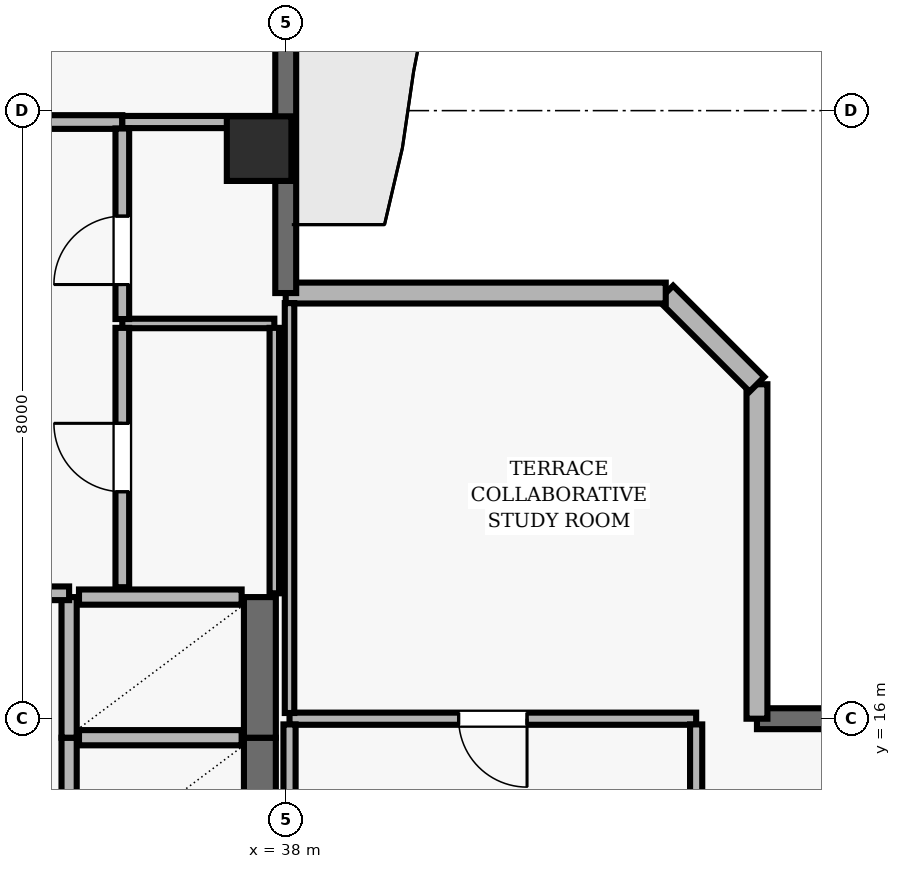
"""IFC4 building model, lengths in metres.
Left out: names, types, materials, properties, quantities, classifications, styles, units other than length and angle.
Written with IfcOpenShell. Run it as: python <this file> out.ifc"""

import sys

from ifc_helpers import new_model, si_unit, direction, frame, frame_2d, origin, origin_2d, place, context, subcontext, project, spatial, rectangle, extrude, element, fill, save


model = new_model("IFC4")
c1 = context("Model", 3, precision=1e-05, world=origin(), true_north=direction((0.0, 1.0)))
c2 = subcontext(c1, "Body", "Model", "MODEL_VIEW")
j1 = project(units=[si_unit("LENGTHUNIT", "METRE"), si_unit("PLANEANGLEUNIT", "RADIAN")], contexts=[c1])
p1 = place(None, origin())
s1 = spatial("IfcSite", under=j1, at=p1, CompositionType="ELEMENT")
p2 = place(p1, origin())
s2 = spatial("IfcBuilding", under=s1, at=p2, CompositionType="ELEMENT")
p3 = place(p2, frame((0.0, 0.0, 298.9)))
s3 = spatial("IfcBuildingStorey", under=s2, at=p3, CompositionType="ELEMENT", Elevation=298.9)
p4 = place(p3, frame((37.65, 23.5, 0.0), z_axis=(0.0, 0.0, 1.0), x_axis=(1.0, 0.0, 0.0)))
e1 = element("IfcColumn", 1, at=p4, inside=s3, PredefinedType="COLUMN", context=c2, shape_type="SweptSolid", body=[
    extrude(rectangle(XDim=0.85, YDim=0.85, at=origin_2d()), origin(), (0.0, 0.0, 1.0), 3.9),
])
p5 = place(p3, frame((57.3, 16.0, 0.0), z_axis=(0.0, 0.0, 1.0), x_axis=(-1.0, 0.0, 0.0)))
e2 = element("IfcWall", 2, at=p5, inside=s3, PredefinedType="SOLIDWALL", context=c2, shape_type="SweptSolid", body=[
    extrude(rectangle(XDim=13.1, YDim=0.275, at=frame_2d((6.55, 0.0))), origin(), (0.0, 0.0, 1.0), 3.69),
])
p6 = place(p5, frame((7.05, 0.0, 0.0)))
e3 = element("IfcOpeningElement", 3, at=p6, cuts=e2, PredefinedType="OPENING", context=c2, shape_type="SweptSolid", body=[
    extrude(rectangle(XDim=1.0, YDim=2.2, at=frame_2d((0.5, 1.1))), frame((0.0, 0.147, 0.0), z_axis=(0.0, -1.0, 0.0), x_axis=(1.0, 0.0, 0.0)), (0.0, 0.0, 1.0), 0.295),
])
p7 = place(p5, frame((9.975, 0.0, 0.9)))
e4 = element("IfcOpeningElement", 4, at=p7, cuts=e2, PredefinedType="OPENING", context=c2, shape_type="SweptSolid", body=[
    extrude(rectangle(XDim=1.5, YDim=1.8, at=frame_2d((0.75, 0.9))), frame((0.0, 0.147, 0.0), z_axis=(0.0, -1.0, 0.0), x_axis=(1.0, 0.0, 0.0)), (0.0, 0.0, 1.0), 0.295),
])
p8 = place(p3, frame((44.2, 16.0, 0.0), z_axis=(0.0, 0.0, 1.0), x_axis=(0.0, 1.0, 0.0)))
e5 = element("IfcWall", 5, at=p8, inside=s3, PredefinedType="SOLIDWALL", context=c2, shape_type="SweptSolid", body=[
    extrude(rectangle(XDim=4.4, YDim=0.275, at=frame_2d((2.2, 0.0))), origin(), (0.0, 0.0, 1.0), 3.69),
])
p9 = place(p3, frame((44.2, 20.4, 0.0), z_axis=(0.0, 0.0, 1.0), x_axis=(-0.707034851297, 0.707178703759, 0.0)))
e6 = element("IfcWall", 6, at=p9, inside=s3, PredefinedType="SOLIDWALL", context=c2, shape_type="SweptSolid", body=[
    extrude(rectangle(XDim=1.697, YDim=0.275, at=frame_2d((0.849, 0.0))), origin(), (0.0, 0.0, 1.0), 3.69),
])
p10 = place(p3, frame((43.0, 21.6, 0.0), z_axis=(0.0, 0.0, 1.0), x_axis=(-1.0, 0.0, 0.0)))
e7 = element("IfcWall", 7, at=p10, inside=s3, PredefinedType="SOLIDWALL", context=c2, shape_type="SweptSolid", body=[
    extrude(rectangle(XDim=5.0, YDim=0.275, at=frame_2d((2.5, 0.0))), origin(), (0.0, 0.0, 1.0), 3.69),
])
p11 = place(p3, frame((38.0, 21.6, 0.0), z_axis=(0.0, 0.0, 1.0), x_axis=(0.0, 1.0, 0.0)))
e8 = element("IfcWall", 8, at=p11, inside=s3, PredefinedType="SOLIDWALL", context=c2, shape_type="SweptSolid", body=[
    extrude(rectangle(XDim=13.7, YDim=0.275, at=frame_2d((6.85, 0.0))), origin(), (0.0, 0.0, 1.0), 3.69),
])
p12 = place(p11, frame((5.35, 0.0, 0.0)))
e9 = element("IfcOpeningElement", 9, at=p12, cuts=e8, PredefinedType="OPENING", context=c2, shape_type="SweptSolid", body=[
    extrude(rectangle(XDim=1.0, YDim=2.2, at=frame_2d((0.5, 1.1))), frame((0.0, 0.147, 0.0), z_axis=(0.0, -1.0, 0.0), x_axis=(1.0, 0.0, 0.0)), (0.0, 0.0, 1.0), 0.295),
])
p13 = place(p11, frame((9.375, 0.0, 0.9)))
e10 = element("IfcOpeningElement", 10, at=p13, cuts=e8, PredefinedType="OPENING", context=c2, shape_type="SweptSolid", body=[
    extrude(rectangle(XDim=1.8, YDim=2.2, at=frame_2d((0.9, 1.1))), frame((0.0, 0.147, 0.0), z_axis=(0.0, -1.0, 0.0), x_axis=(1.0, 0.0, 0.0)), (0.0, 0.0, 1.0), 0.295),
])
p14 = place(p3, frame((35.15, 15.75, 0.0), z_axis=(0.0, 0.0, 1.0), x_axis=(0.0, -1.0, 0.0)))
e11 = element("IfcWall", 11, at=p14, inside=s3, PredefinedType="SOLIDWALL", context=c2, shape_type="SweptSolid", body=[
    extrude(rectangle(XDim=1.85, YDim=0.2, at=frame_2d((0.925, 0.0))), origin(), (0.0, 0.0, 1.0), 3.69),
])
p15 = place(p3, frame((37.66, 13.9, 0.0), z_axis=(0.0, 0.0, 1.0), x_axis=(0.0, 1.0, 0.0)))
e12 = element("IfcWall", 12, at=p15, inside=s3, PredefinedType="SHEAR", context=c2, shape_type="SweptSolid", body=[
    extrude(rectangle(XDim=1.85, YDim=0.42, at=frame_2d((0.925, 0.0))), origin(), (0.0, 0.0, 1.0), 3.69),
])
p16 = place(p3, frame((37.42, 15.75, 0.0), z_axis=(0.0, 0.0, 1.0), x_axis=(-1.0, 0.0, 0.0)))
e13 = element("IfcWall", 13, at=p16, inside=s3, PredefinedType="SOLIDWALL", context=c2, shape_type="SweptSolid", body=[
    extrude(rectangle(XDim=2.14, YDim=0.2, at=frame_2d((1.07, 0.0))), origin(), (0.0, 0.0, 1.0), 3.69),
])
p17 = place(p3, frame((35.15, 17.6, 0.0), z_axis=(0.0, 0.0, 1.0), x_axis=(0.0, -1.0, 0.0)))
e14 = element("IfcWall", 14, at=p17, inside=s3, PredefinedType="SOLIDWALL", context=c2, shape_type="SweptSolid", body=[
    extrude(rectangle(XDim=1.85, YDim=0.2, at=frame_2d((0.925, 0.0))), origin(), (0.0, 0.0, 1.0), 3.69),
])
p18 = place(p3, frame((37.66, 15.75, 0.0), z_axis=(0.0, 0.0, 1.0), x_axis=(0.0, 1.0, 0.0)))
e15 = element("IfcWall", 15, at=p18, inside=s3, PredefinedType="SHEAR", context=c2, shape_type="SweptSolid", body=[
    extrude(rectangle(XDim=1.85, YDim=0.42, at=frame_2d((0.925, 0.0))), origin(), (0.0, 0.0, 1.0), 3.69),
])
p19 = place(p3, frame((37.42, 17.6, 0.0), z_axis=(0.0, 0.0, 1.0), x_axis=(-1.0, 0.0, 0.0)))
e16 = element("IfcWall", 16, at=p19, inside=s3, PredefinedType="SOLIDWALL", context=c2, shape_type="SweptSolid", body=[
    extrude(rectangle(XDim=2.14, YDim=0.2, at=frame_2d((1.07, 0.0))), origin(), (0.0, 0.0, 1.0), 3.69),
])
p20 = place(p3, frame((33.85, 17.65, 0.0), z_axis=(0.0, 0.0, 1.0), x_axis=(1.0, 0.0, 0.0)))
e17 = element("IfcWall", 17, at=p20, inside=s3, PredefinedType="PARTITIONING", context=c2, shape_type="SweptSolid", body=[
    extrude(rectangle(XDim=1.3, YDim=0.18, at=frame_2d((0.65, 0.0))), origin(), (0.0, 0.0, 1.0), 3.69),
])
p21 = place(p3, frame((35.85, 21.2, 0.0), z_axis=(0.0, 0.0, 1.0), x_axis=(1.0, 0.0, 0.0)))
e18 = element("IfcWall", 18, at=p21, inside=s3, PredefinedType="PARTITIONING", context=c2, shape_type="SweptSolid", body=[
    extrude(rectangle(XDim=2.0, YDim=0.125, at=frame_2d((1.0, 0.0))), origin(), (0.0, 0.0, 1.0), 3.69),
])
p22 = place(p3, frame((35.85, 23.85, 0.0), z_axis=(0.0, 0.0, 1.0), x_axis=(-1.0, 0.0, 0.0)))
e19 = element("IfcWall", 19, at=p22, inside=s3, PredefinedType="PARTITIONING", context=c2, shape_type="SweptSolid", body=[
    extrude(rectangle(XDim=2.0, YDim=0.18, at=frame_2d((1.0, 0.0))), origin(), (0.0, 0.0, 1.0), 3.227),
])
p23 = place(p3, frame((37.85, 23.85, 0.0), z_axis=(0.0, 0.0, 1.0), x_axis=(-1.0, 0.0, 0.0)))
e20 = element("IfcWall", 20, at=p23, inside=s3, PredefinedType="PARTITIONING", context=c2, shape_type="SweptSolid", body=[
    extrude(rectangle(XDim=2.0, YDim=0.16, at=frame_2d((1.0, 0.0))), origin(), (0.0, 0.0, 1.0), 3.227),
])
p24 = place(p3, frame((43.4, 16.0, 0.0), z_axis=(0.0, 0.0, 1.0), x_axis=(-1.0, 0.0, 0.0)))
e21 = element("IfcWall", 21, at=p24, inside=s3, PredefinedType="PARTITIONING", context=c2, shape_type="SweptSolid", body=[
    extrude(rectangle(XDim=5.35, YDim=0.16, at=frame_2d((2.675, 0.0))), origin(), (0.0, 0.0, 1.0), 3.39),
])
p25 = place(p24, frame((2.225, 0.0, 0.0)))
e22 = element("IfcOpeningElement", 22, at=p25, cuts=e21, PredefinedType="OPENING", context=c2, shape_type="SweptSolid", body=[
    extrude(rectangle(XDim=0.9, YDim=2.1, at=frame_2d((0.45, 1.05))), frame((0.0, 0.09, 0.0), z_axis=(0.0, -1.0, 0.0), x_axis=(1.0, 0.0, 0.0)), (0.0, 0.0, 1.0), 0.18),
])
p26 = place(p3, frame((35.85, 17.73, 0.0), z_axis=(0.0, 0.0, 1.0), x_axis=(0.0, 1.0, 0.0)))
e23 = element("IfcWall", 23, at=p26, inside=s3, PredefinedType="PARTITIONING", context=c2, shape_type="SweptSolid", body=[
    extrude(rectangle(XDim=3.412, YDim=0.18, at=frame_2d((1.706, 0.0))), origin(), (0.0, 0.0, 1.0), 3.69),
])
p27 = place(p26, frame((1.256, 0.0, 0.0)))
e24 = element("IfcOpeningElement", 24, at=p27, cuts=e23, PredefinedType="OPENING", context=c2, shape_type="SweptSolid", body=[
    extrude(rectangle(XDim=0.9, YDim=2.1, at=frame_2d((0.45, 1.05))), frame((0.0, 0.1, 0.0), z_axis=(0.0, -1.0, 0.0), x_axis=(1.0, 0.0, 0.0)), (0.0, 0.0, 1.0), 0.2),
])
p28 = place(p3, frame((35.85, 21.258, 0.0), z_axis=(0.0, 0.0, 1.0), x_axis=(0.0, 1.0, 0.0)))
e25 = element("IfcWall", 25, at=p28, inside=s3, PredefinedType="PARTITIONING", context=c2, shape_type="SweptSolid", body=[
    extrude(rectangle(XDim=2.507, YDim=0.18, at=frame_2d((1.253, 0.0))), origin(), (0.0, 0.0, 1.0), 3.69),
])
p29 = place(p28, frame((0.454, 0.0, 0.0)))
e26 = element("IfcOpeningElement", 26, at=p29, cuts=e25, PredefinedType="OPENING", context=c2, shape_type="SweptSolid", body=[
    extrude(rectangle(XDim=0.9, YDim=2.1, at=frame_2d((0.45, 1.05))), frame((0.0, 0.1, 0.0), z_axis=(0.0, -1.0, 0.0), x_axis=(1.0, 0.0, 0.0)), (0.0, 0.0, 1.0), 0.2),
])
p30 = place(p3, frame((37.85, 17.65, 0.0), z_axis=(0.0, 0.0, 1.0), x_axis=(0.0, 1.0, 0.0)))
e27 = element("IfcWall", 27, at=p30, inside=s3, PredefinedType="PARTITIONING", context=c2, shape_type="SweptSolid", body=[
    extrude(rectangle(XDim=3.492, YDim=0.125, at=frame_2d((1.746, 0.0))), origin(), (0.0, 0.0, 1.0), 3.227),
])
p31 = place(p3, frame((38.05, 15.925, 0.0), z_axis=(0.0, 0.0, 1.0), x_axis=(0.0, -1.0, 0.0)))
e28 = element("IfcWall", 28, at=p31, inside=s3, PredefinedType="PARTITIONING", context=c2, shape_type="SweptSolid", body=[
    extrude(rectangle(XDim=6.375, YDim=0.16, at=frame_2d((3.188, 0.0))), origin(), (0.0, 0.0, 1.0), 3.227),
])
p32 = place(p3, frame((38.05, 21.468, 0.0), z_axis=(0.0, 0.0, 1.0), x_axis=(0.0, -1.0, 0.0)))
e29 = element("IfcWall", 29, at=p32, inside=s3, PredefinedType="PARTITIONING", context=c2, shape_type="SweptSolid", body=[
    extrude(rectangle(XDim=5.393, YDim=0.125, at=frame_2d((2.697, 0.0))), origin(), (0.0, 0.0, 1.0), 3.227),
])
p33 = place(p3, frame((43.4, 10.425, 0.0), z_axis=(0.0, 0.0, 1.0), x_axis=(0.0, 1.0, 0.0)))
e30 = element("IfcWall", 30, at=p33, inside=s3, PredefinedType="PARTITIONING", context=c2, shape_type="SweptSolid", body=[
    extrude(rectangle(XDim=5.5, YDim=0.16, at=frame_2d((2.75, 0.0))), origin(), (0.0, 0.0, 1.0), 3.69),
])
p34 = place(p33, frame((2.3, 0.0, 0.0)))
e31 = element("IfcOpeningElement", 31, at=p34, cuts=e30, PredefinedType="OPENING", context=c2, shape_type="SweptSolid", body=[
    extrude(rectangle(XDim=0.9, YDim=2.1, at=frame_2d((0.45, 1.05))), frame((0.0, 0.09, 0.0), z_axis=(0.0, -1.0, 0.0), x_axis=(1.0, 0.0, 0.0)), (0.0, 0.0, 1.0), 0.18),
])
p35 = place(p29, origin())
e32 = element("IfcDoor", 32, at=p35, inside=s3, OperationType="SINGLE_SWING_LEFT", PredefinedType="DOOR", context=c2, shape_type="SweptSolid", body=[
    extrude(rectangle(XDim=0.9, YDim=2.1, at=frame_2d((0.45, 1.05))), frame((0.0, 0.025, 0.0), z_axis=(0.0, -1.0, 0.0), x_axis=(1.0, 0.0, 0.0)), (0.0, 0.0, 1.0), 0.05),
])
fill(e26, e32)
p36 = place(p27, origin())
e33 = element("IfcDoor", 33, at=p36, inside=s3, OperationType="SINGLE_SWING_RIGHT", PredefinedType="DOOR", context=c2, shape_type="SweptSolid", body=[
    extrude(rectangle(XDim=0.9, YDim=2.1, at=frame_2d((0.45, 1.05))), frame((0.0, 0.025, 0.0), z_axis=(0.0, -1.0, 0.0), x_axis=(1.0, 0.0, 0.0)), (0.0, 0.0, 1.0), 0.05),
])
fill(e24, e33)
p37 = place(p25, origin())
e34 = element("IfcDoor", 34, at=p37, inside=s3, OperationType="SINGLE_SWING_LEFT", PredefinedType="DOOR", context=c2, shape_type="SweptSolid", body=[
    extrude(rectangle(XDim=0.9, YDim=2.1, at=frame_2d((0.45, 1.05))), frame((0.0, 0.025, 0.0), z_axis=(0.0, -1.0, 0.0), x_axis=(1.0, 0.0, 0.0)), (0.0, 0.0, 1.0), 0.05),
])
fill(e22, e34)
save(model, sys.argv[1])
